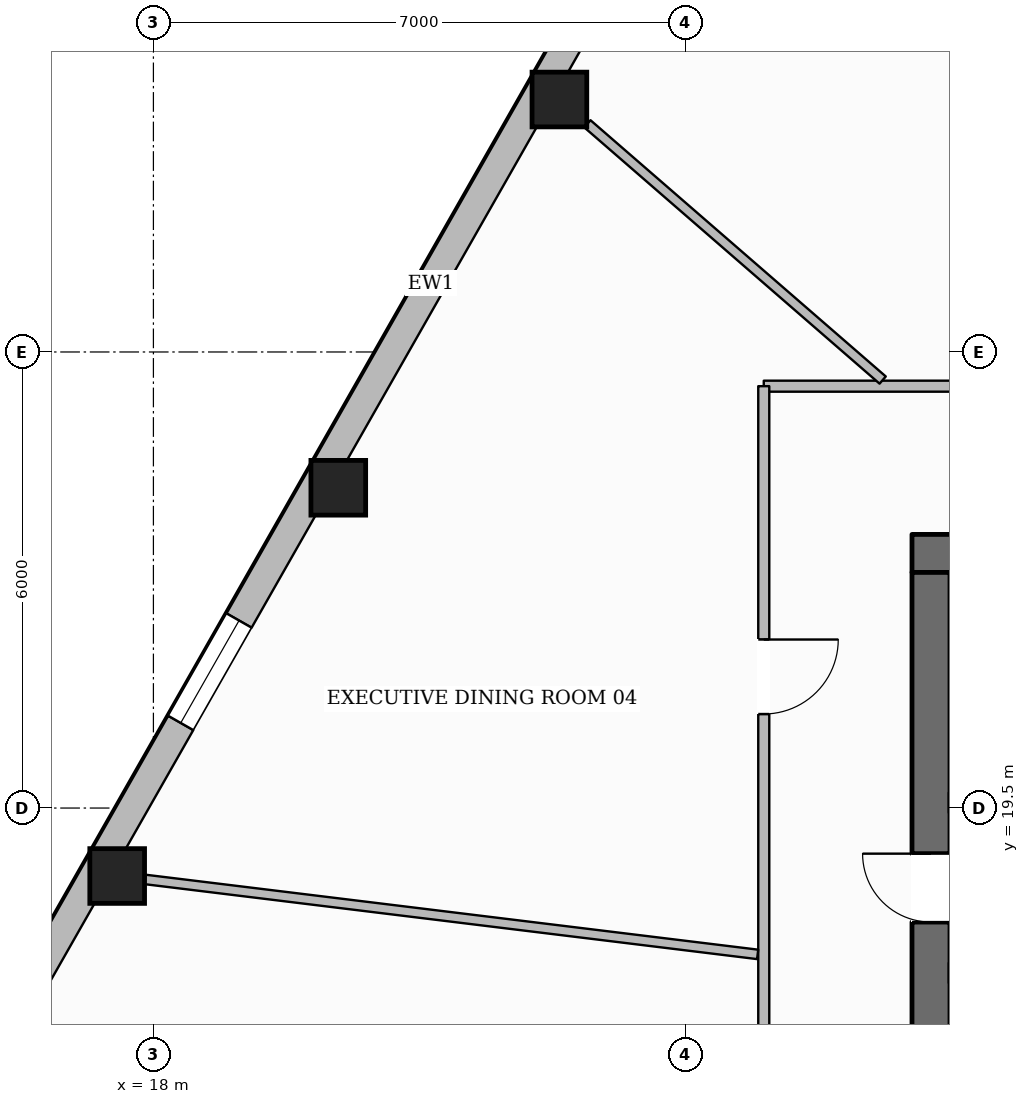
"""IFC4 building model, lengths in metres.
Left out: names, types, materials, properties, quantities, classifications, styles, units other than length and angle.
Written with IfcOpenShell. Run it as: python <this file> out.ifc"""

import sys

from ifc_helpers import new_model, si_unit, direction, frame, frame_2d, origin, origin_2d, place, context, subcontext, project, spatial, rectangle, hollow_rectangle, extrude, element, fill, save


model = new_model("IFC4")
c1 = context("Model", 3, precision=1e-05, world=origin(), true_north=direction((0.0, 1.0)))
c2 = subcontext(c1, "Body", "Model", "MODEL_VIEW")
j1 = project(units=[si_unit("LENGTHUNIT", "METRE"), si_unit("PLANEANGLEUNIT", "RADIAN")], contexts=[c1])
p1 = place(None, origin())
s1 = spatial("IfcSite", under=j1, at=p1, CompositionType="ELEMENT")
p2 = place(p1, origin())
s2 = spatial("IfcBuilding", under=s1, at=p2, CompositionType="ELEMENT")
p3 = place(p2, frame((0.0, 0.0, 112.45)))
s3 = spatial("IfcBuildingStorey", under=s2, at=p3, CompositionType="ELEMENT", Elevation=112.45)
p4 = place(p3, frame((27.98, 22.85, 0.0), z_axis=(0.0, 0.0, 1.0), x_axis=(1.0, 0.0, 0.0)))
e1 = element("IfcWall", 1, at=p4, inside=s3, PredefinedType="SOLIDWALL", context=c2, shape_type="SweptSolid", body=[
    extrude(rectangle(XDim=20.04, YDim=0.5, at=frame_2d((10.02, 0.0))), origin(), (0.0, 0.0, 1.0), 3.6),
])
p5 = place(p4, frame((6.295, 0.0, 0.0)))
e2 = element("IfcOpeningElement", 2, at=p5, cuts=e1, PredefinedType="OPENING", context=c2, shape_type="SweptSolid", body=[
    extrude(rectangle(XDim=1.05, YDim=2.15, at=frame_2d((0.525, 1.075))), frame((0.0, 0.26, 0.0), z_axis=(0.0, -1.0, 0.0), x_axis=(1.0, 0.0, 0.0)), (0.0, 0.0, 1.0), 0.52),
])
p6 = place(p4, frame((12.695, 0.0, 0.0)))
e3 = element("IfcOpeningElement", 3, at=p6, cuts=e1, PredefinedType="OPENING", context=c2, shape_type="SweptSolid", body=[
    extrude(rectangle(XDim=1.05, YDim=2.15, at=frame_2d((0.525, 1.075))), frame((0.0, 0.26, 0.0), z_axis=(0.0, -1.0, 0.0), x_axis=(1.0, 0.0, 0.0)), (0.0, 0.0, 1.0), 0.52),
])
p7 = place(p3, frame((28.23, 9.6, 0.0), z_axis=(0.0, 0.0, 1.0), x_axis=(0.0, 1.0, 0.0)))
e4 = element("IfcWall", 4, at=p7, inside=s3, PredefinedType="SOLIDWALL", context=c2, shape_type="SweptSolid", body=[
    extrude(rectangle(XDim=13.0, YDim=0.5, at=frame_2d((6.5, 0.0))), origin(), (0.0, 0.0, 1.0), 3.6),
])
p8 = place(p7, frame((0.2, 0.0, 0.0)))
e5 = element("IfcOpeningElement", 5, at=p8, cuts=e4, PredefinedType="OPENING", context=c2, shape_type="SweptSolid", body=[
    extrude(rectangle(XDim=1.1, YDim=2.15, at=frame_2d((0.55, 1.075))), frame((0.0, 0.26, 0.0), z_axis=(0.0, -1.0, 0.0), x_axis=(1.0, 0.0, 0.0)), (0.0, 0.0, 1.0), 0.52),
])
p9 = place(p7, frame((8.4, 0.0, 0.0)))
e6 = element("IfcOpeningElement", 6, at=p9, cuts=e4, PredefinedType="OPENING", context=c2, shape_type="SweptSolid", body=[
    extrude(rectangle(XDim=0.9, YDim=2.1, at=frame_2d((0.45, 1.05))), frame((0.0, 0.26, 0.0), z_axis=(0.0, -1.0, 0.0), x_axis=(1.0, 0.0, 0.0)), (0.0, 0.0, 1.0), 0.52),
])
for number, where, z_axis, x_axis in (
    (7, (23.342, 28.821, 0.0), (0.0, 0.0, 1.0), (1.0, 0.0, 0.0)),
    (8, (20.432, 23.714, 0.0), (0.0, 0.0, 1.0), (1.0, 0.0, 0.0)),
    (9, (17.523, 18.606, 0.0), (0.0, 0.0, 1.0), (1.0, 0.0, 0.0)),
):
    element("IfcColumn", number, at=place(p3, frame(where, z_axis=z_axis, x_axis=x_axis)), inside=s3, PredefinedType="COLUMN", context=c2, shape_type="SweptSolid", body=[
        extrude(hollow_rectangle(XDim=0.72, YDim=0.72, WallThickness=0.032, at=origin_2d()), origin(), (0.0, 0.0, 1.0), 3.6),
    ])
p10 = place(p3, frame((14.144, 13.219, 0.0), z_axis=(0.0, 0.0, 1.0), x_axis=(0.494900960409, 0.868949388277, 0.0)))
e10 = element("IfcWall", 10, at=p10, inside=s3, PredefinedType="STANDARD", context=c2, shape_type="SweptSolid", body=[
    extrude(rectangle(XDim=36.225, YDim=0.38, at=frame_2d((18.113, 0.0))), origin(), (0.0, 0.0, 1.0), 3.059),
])
p11 = place(p10, frame((32.03, 0.0, 0.65)))
e11 = element("IfcOpeningElement", 11, at=p11, cuts=e10, PredefinedType="OPENING", context=c2, shape_type="SweptSolid", body=[
    extrude(rectangle(XDim=1.55, YDim=1.75, at=frame_2d((0.775, 0.875))), frame((0.0, 0.2, 0.0), z_axis=(0.0, -1.0, 0.0), x_axis=(1.0, 0.0, 0.0)), (0.0, 0.0, 1.0), 0.4),
])
p12 = place(p10, frame((26.152, 0.0, 0.65)))
e12 = element("IfcOpeningElement", 12, at=p12, cuts=e10, PredefinedType="OPENING", context=c2, shape_type="SweptSolid", body=[
    extrude(rectangle(XDim=1.55, YDim=1.75, at=frame_2d((0.775, 0.875))), frame((0.0, 0.2, 0.0), z_axis=(0.0, -1.0, 0.0), x_axis=(1.0, 0.0, 0.0)), (0.0, 0.0, 1.0), 0.4),
])
p13 = place(p10, frame((20.274, 0.0, 0.65)))
e13 = element("IfcOpeningElement", 13, at=p13, cuts=e10, PredefinedType="OPENING", context=c2, shape_type="SweptSolid", body=[
    extrude(rectangle(XDim=1.55, YDim=1.75, at=frame_2d((0.775, 0.875))), frame((0.0, 0.2, 0.0), z_axis=(0.0, -1.0, 0.0), x_axis=(1.0, 0.0, 0.0)), (0.0, 0.0, 1.0), 0.4),
])
p14 = place(p10, frame((8.518, 0.0, 0.65)))
e14 = element("IfcOpeningElement", 14, at=p14, cuts=e10, PredefinedType="OPENING", context=c2, shape_type="SweptSolid", body=[
    extrude(rectangle(XDim=1.55, YDim=1.75, at=frame_2d((0.775, 0.875))), frame((0.0, 0.2, 0.0), z_axis=(0.0, -1.0, 0.0), x_axis=(1.0, 0.0, 0.0)), (0.0, 0.0, 1.0), 0.4),
])
p15 = place(p10, frame((2.64, 0.0, 0.65)))
e15 = element("IfcOpeningElement", 15, at=p15, cuts=e10, PredefinedType="OPENING", context=c2, shape_type="SweptSolid", body=[
    extrude(rectangle(XDim=1.55, YDim=1.75, at=frame_2d((0.775, 0.875))), frame((0.0, 0.2, 0.0), z_axis=(0.0, -1.0, 0.0), x_axis=(1.0, 0.0, 0.0)), (0.0, 0.0, 1.0), 0.4),
])
p16 = place(p3, frame((49.97, 25.05, 0.0), z_axis=(0.0, 0.0, 1.0), x_axis=(-1.0, 0.0, 0.0)))
e16 = element("IfcWall", 16, at=p16, inside=s3, PredefinedType="PARTITIONING", context=c2, shape_type="SweptSolid", body=[
    extrude(rectangle(XDim=23.94, YDim=0.145, at=frame_2d((11.97, 0.0))), origin(), (0.0, 0.0, 1.0), 3.6),
])
p17 = place(p16, frame((14.53, 0.0, 0.0)))
e17 = element("IfcOpeningElement", 17, at=p17, cuts=e16, PredefinedType="OPENING", context=c2, shape_type="SweptSolid", body=[
    extrude(rectangle(XDim=0.88, YDim=2.1, at=frame_2d((0.44, 1.05))), frame((0.0, 0.083, 0.0), z_axis=(0.0, -1.0, 0.0), x_axis=(1.0, 0.0, 0.0)), (0.0, 0.0, 1.0), 0.165),
])
p18 = place(p16, frame((12.01, 0.0, 0.0)))
e18 = element("IfcOpeningElement", 18, at=p18, cuts=e16, PredefinedType="OPENING", context=c2, shape_type="SweptSolid", body=[
    extrude(rectangle(XDim=0.88, YDim=2.1, at=frame_2d((0.44, 1.05))), frame((0.0, 0.083, 0.0), z_axis=(0.0, -1.0, 0.0), x_axis=(1.0, 0.0, 0.0)), (0.0, 0.0, 1.0), 0.165),
])
p19 = place(p16, frame((9.55, 0.0, 0.0)))
e19 = element("IfcOpeningElement", 19, at=p19, cuts=e16, PredefinedType="OPENING", context=c2, shape_type="SweptSolid", body=[
    extrude(rectangle(XDim=0.96, YDim=2.1, at=frame_2d((0.48, 1.05))), frame((0.0, 0.083, 0.0), z_axis=(0.0, -1.0, 0.0), x_axis=(1.0, 0.0, 0.0)), (0.0, 0.0, 1.0), 0.165),
])
p20 = place(p16, frame((2.298, 0.0, 0.0)))
e20 = element("IfcOpeningElement", 20, at=p20, cuts=e16, PredefinedType="OPENING", context=c2, shape_type="SweptSolid", body=[
    extrude(rectangle(XDim=0.98, YDim=2.15, at=frame_2d((0.49, 1.075))), frame((0.0, 0.083, 0.0), z_axis=(0.0, -1.0, 0.0), x_axis=(1.0, 0.0, 0.0)), (0.0, 0.0, 1.0), 0.165),
])
p21 = place(p16, frame((18.547, 0.0, 0.0)))
e21 = element("IfcOpeningElement", 21, at=p21, cuts=e16, PredefinedType="OPENING", context=c2, shape_type="SweptSolid", body=[
    extrude(rectangle(XDim=1.4, YDim=2.2, at=frame_2d((0.7, 1.1))), frame((0.0, 0.083, 0.0), z_axis=(0.0, -1.0, 0.0), x_axis=(1.0, 0.0, 0.0)), (0.0, 0.0, 1.0), 0.165),
])
p22 = place(p3, frame((26.03, 25.05, 0.0), z_axis=(0.0, 0.0, 1.0), x_axis=(0.0, -1.0, 0.0)))
e22 = element("IfcWall", 22, at=p22, inside=s3, PredefinedType="PARTITIONING", context=c2, shape_type="SweptSolid", body=[
    extrude(rectangle(XDim=17.9, YDim=0.145, at=frame_2d((8.95, 0.0))), origin(), (0.0, 0.0, 1.0), 3.288),
])
p23 = place(p22, frame((3.333, 0.0, 0.0)))
e23 = element("IfcOpeningElement", 23, at=p23, cuts=e22, PredefinedType="OPENING", context=c2, shape_type="SweptSolid", body=[
    extrude(rectangle(XDim=0.98, YDim=2.15, at=frame_2d((0.49, 1.075))), frame((0.0, 0.083, 0.0), z_axis=(0.0, -1.0, 0.0), x_axis=(1.0, 0.0, 0.0)), (0.0, 0.0, 1.0), 0.165),
])
p24 = place(p22, frame((11.902, 0.0, 0.0)))
e24 = element("IfcOpeningElement", 24, at=p24, cuts=e22, PredefinedType="OPENING", context=c2, shape_type="SweptSolid", body=[
    extrude(rectangle(XDim=1.4, YDim=2.2, at=frame_2d((0.7, 1.1))), frame((0.0, 0.083, 0.0), z_axis=(0.0, -1.0, 0.0), x_axis=(1.0, 0.0, 0.0)), (0.0, 0.0, 1.0), 0.165),
])
p25 = place(p3, frame((27.594, 25.131, 0.0), z_axis=(0.0, 0.0, 1.0), x_axis=(-0.75527236731, 0.655411055124, 0.0)))
e25 = element("IfcWall", 25, at=p25, inside=s3, PredefinedType="PARTITIONING", context=c2, shape_type="SweptSolid", body=[
    extrude(rectangle(XDim=5.144, YDim=0.125, at=frame_2d((2.572, 0.0))), origin(), (0.0, 0.0, 1.0), 3.141),
])
p26 = place(p3, frame((25.949, 17.575, 0.0), z_axis=(0.0, 0.0, 1.0), x_axis=(-0.992595641005, 0.121465606072, 0.0)))
e26 = element("IfcWall", 26, at=p26, inside=s3, PredefinedType="PARTITIONING", context=c2, shape_type="SweptSolid", body=[
    extrude(rectangle(XDim=8.118, YDim=0.125, at=frame_2d((4.059, 0.0))), origin(), (0.0, 0.0, 1.0), 3.141),
])
p27 = place(p14, origin())
e27 = element("IfcWindow", 27, at=p27, inside=s3, PartitioningType="SINGLE_PANEL", PredefinedType="WINDOW", context=c2, shape_type="SweptSolid", body=[
    extrude(rectangle(XDim=1.55, YDim=1.75, at=frame_2d((0.775, 0.875))), frame((0.0, 0.03, 0.0), z_axis=(0.0, -1.0, 0.0), x_axis=(1.0, 0.0, 0.0)), (0.0, 0.0, 1.0), 0.06),
])
fill(e14, e27)
p28 = place(p9, origin())
e28 = element("IfcDoor", 28, at=p28, inside=s3, OperationType="SINGLE_SWING_RIGHT", PredefinedType="DOOR", context=c2, shape_type="SweptSolid", body=[
    extrude(rectangle(XDim=0.9, YDim=2.1, at=frame_2d((0.45, 1.05))), frame((0.0, 0.025, 0.0), z_axis=(0.0, -1.0, 0.0), x_axis=(1.0, 0.0, 0.0)), (0.0, 0.0, 1.0), 0.05),
])
fill(e6, e28)
p29 = place(p23, origin())
e29 = element("IfcDoor", 29, at=p29, inside=s3, OperationType="SINGLE_SWING_LEFT", PredefinedType="DOOR", context=c2, shape_type="SweptSolid", body=[
    extrude(rectangle(XDim=0.98, YDim=2.15, at=frame_2d((0.49, 1.075))), frame((0.0, 0.025, 0.0), z_axis=(0.0, -1.0, 0.0), x_axis=(1.0, 0.0, 0.0)), (0.0, 0.0, 1.0), 0.05),
])
fill(e23, e29)
save(model, sys.argv[1])
